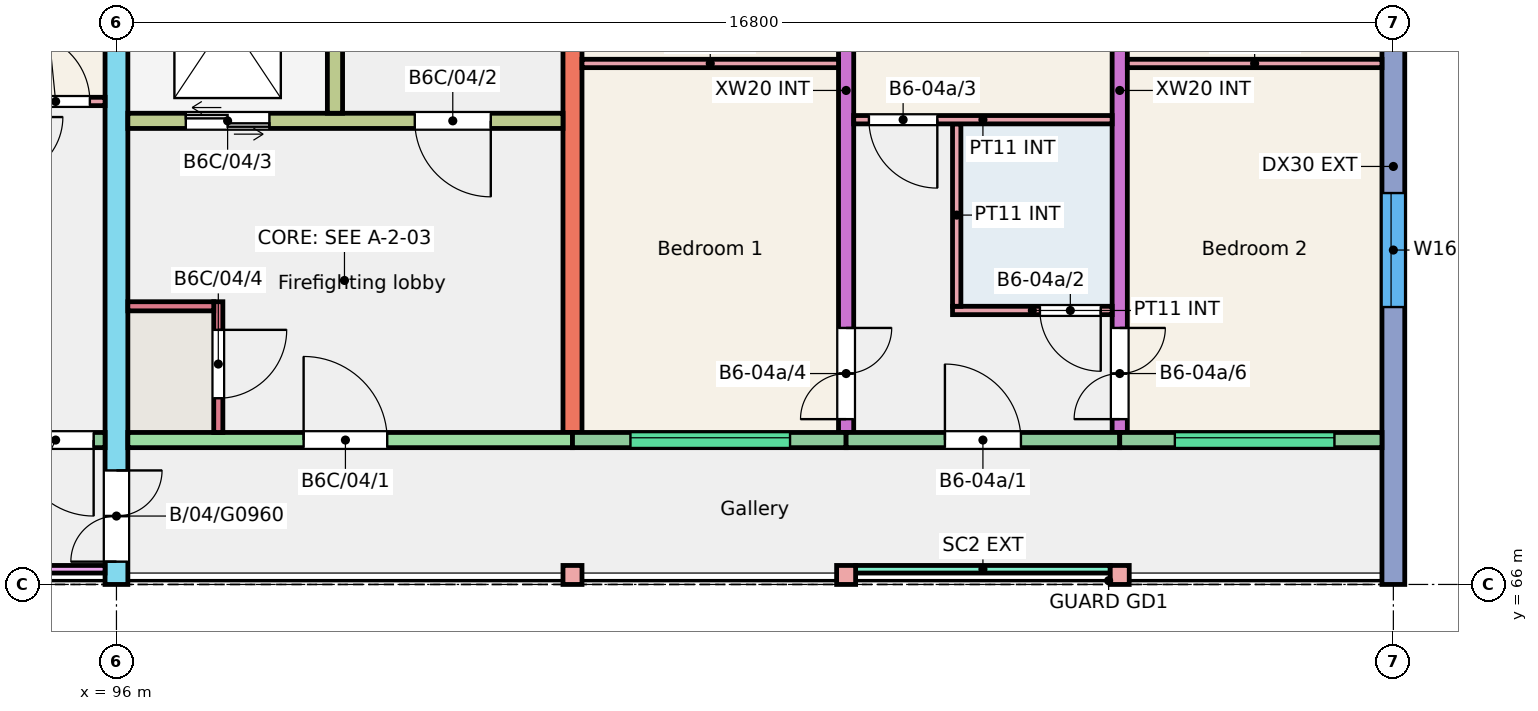
"""IFC4 building model, lengths in metres.
Left out: names, types, materials, properties, quantities, classifications, styles, units other than length and angle.
Written with IfcOpenShell. Run it as: python <this file> out.ifc"""

import sys

from ifc_helpers import new_model, si_unit, direction, frame, frame_2d, origin, origin_2d, place, context, subcontext, project, spatial, rectangle, extrude, element, fill, save


model = new_model("IFC4")
c1 = context("Model", 3, precision=1e-05, world=origin(), true_north=direction((0.0, 1.0)))
c2 = subcontext(c1, "Body", "Model", "MODEL_VIEW")
j1 = project(units=[si_unit("LENGTHUNIT", "METRE"), si_unit("PLANEANGLEUNIT", "RADIAN")], contexts=[c1])
p1 = place(None, origin())
s1 = spatial("IfcSite", under=j1, at=p1, CompositionType="ELEMENT")
p2 = place(p1, origin())
s2 = spatial("IfcBuilding", under=s1, at=p2, CompositionType="ELEMENT")
p3 = place(p2, frame((0.0, 0.0, 12.0)))
s3 = spatial("IfcBuildingStorey", under=s2, at=p3, CompositionType="ELEMENT", Elevation=12.0)
p4 = place(p3, frame((96.0, 66.0, 0.0), z_axis=(0.0, 0.0, 1.0), x_axis=(0.0, 1.0, 0.0)))
e1 = element("IfcWall", 1, at=p4, inside=s3, PredefinedType="SHEAR", context=c2, shape_type="SweptSolid", body=[
    extrude(rectangle(XDim=11.0, YDim=0.3, at=frame_2d((5.5, 0.0))), origin(), (0.0, 0.0, 1.0), 3.0),
])
p5 = place(p4, frame((0.3, 0.0, 0.0)))
e2 = element("IfcOpeningElement", 2, at=p5, cuts=e1, PredefinedType="OPENING", context=c2, shape_type="SweptSolid", body=[
    extrude(rectangle(XDim=1.2, YDim=2.1, at=frame_2d((0.6, 1.05))), frame((0.0, 0.16, 0.0), z_axis=(0.0, -1.0, 0.0), x_axis=(1.0, 0.0, 0.0)), (0.0, 0.0, 1.0), 0.32),
])
p6 = place(p3, frame((102.0, 68.0, 0.0), z_axis=(0.0, 0.0, 1.0), x_axis=(0.0, 1.0, 0.0)))
e3 = element("IfcWall", 3, at=p6, inside=s3, PredefinedType="SHEAR", context=c2, shape_type="SweptSolid", body=[
    extrude(rectangle(XDim=9.0, YDim=0.25, at=frame_2d((4.5, 0.0))), origin(), (0.0, 0.0, 1.0), 3.0),
])
p7 = place(p3, frame((105.6, 68.0, 0.0), z_axis=(0.0, 0.0, 1.0), x_axis=(0.0, 1.0, 0.0)))
e4 = element("IfcWall", 4, at=p7, inside=s3, PredefinedType="SHEAR", context=c2, shape_type="SweptSolid", body=[
    extrude(rectangle(XDim=9.0, YDim=0.2, at=frame_2d((4.5, 0.0))), origin(), (0.0, 0.0, 1.0), 3.0),
])
p8 = place(p7, frame((0.175, 0.0, 0.0)))
e5 = element("IfcOpeningElement", 5, at=p8, cuts=e4, PredefinedType="OPENING", context=c2, shape_type="SweptSolid", body=[
    extrude(rectangle(XDim=1.2, YDim=2.1, at=frame_2d((0.6, 1.05))), frame((0.0, 0.11, 0.0), z_axis=(0.0, -1.0, 0.0), x_axis=(1.0, 0.0, 0.0)), (0.0, 0.0, 1.0), 0.22),
])
p9 = place(p7, frame((6.4, 0.0, 0.0)))
e6 = element("IfcOpeningElement", 6, at=p9, cuts=e4, PredefinedType="OPENING", context=c2, shape_type="SweptSolid", body=[
    extrude(rectangle(XDim=1.2, YDim=2.1, at=frame_2d((0.6, 1.05))), frame((0.0, 0.11, 0.0), z_axis=(0.0, -1.0, 0.0), x_axis=(1.0, 0.0, 0.0)), (0.0, 0.0, 1.0), 0.22),
])
p10 = place(p3, frame((109.2, 68.0, 0.0), z_axis=(0.0, 0.0, 1.0), x_axis=(0.0, 1.0, 0.0)))
e7 = element("IfcWall", 7, at=p10, inside=s3, PredefinedType="SHEAR", context=c2, shape_type="SweptSolid", body=[
    extrude(rectangle(XDim=9.0, YDim=0.2, at=frame_2d((4.5, 0.0))), origin(), (0.0, 0.0, 1.0), 3.0),
])
p11 = place(p10, frame((0.175, 0.0, 0.0)))
e8 = element("IfcOpeningElement", 8, at=p11, cuts=e7, PredefinedType="OPENING", context=c2, shape_type="SweptSolid", body=[
    extrude(rectangle(XDim=1.2, YDim=2.1, at=frame_2d((0.6, 1.05))), frame((0.0, 0.11, 0.0), z_axis=(0.0, -1.0, 0.0), x_axis=(1.0, 0.0, 0.0)), (0.0, 0.0, 1.0), 0.22),
])
p12 = place(p10, frame((6.4, 0.0, 0.0)))
e9 = element("IfcOpeningElement", 9, at=p12, cuts=e7, PredefinedType="OPENING", context=c2, shape_type="SweptSolid", body=[
    extrude(rectangle(XDim=1.2, YDim=2.1, at=frame_2d((0.6, 1.05))), frame((0.0, 0.11, 0.0), z_axis=(0.0, -1.0, 0.0), x_axis=(1.0, 0.0, 0.0)), (0.0, 0.0, 1.0), 0.22),
])
p13 = place(p3, frame((112.8, 66.0, 0.0), z_axis=(0.0, 0.0, 1.0), x_axis=(0.0, 1.0, 0.0)))
e10 = element("IfcWall", 10, at=p13, inside=s3, PredefinedType="SHEAR", context=c2, shape_type="SweptSolid", body=[
    extrude(rectangle(XDim=11.0, YDim=0.3, at=frame_2d((5.5, 0.0))), origin(), (0.0, 0.0, 1.0), 3.0),
])
p14 = place(p13, frame((3.65, 0.0, 0.9)))
e11 = element("IfcOpeningElement", 11, at=p14, cuts=e10, PredefinedType="OPENING", context=c2, shape_type="SweptSolid", body=[
    extrude(rectangle(XDim=1.5, YDim=1.5, at=frame_2d((0.75, 0.75))), frame((0.0, 0.16, 0.0), z_axis=(0.0, -1.0, 0.0), x_axis=(1.0, 0.0, 0.0)), (0.0, 0.0, 1.0), 0.32),
])
p15 = place(p13, frame((8.205, 0.0, 0.9)))
e12 = element("IfcOpeningElement", 12, at=p15, cuts=e10, PredefinedType="OPENING", context=c2, shape_type="SweptSolid", body=[
    extrude(rectangle(XDim=1.5, YDim=1.5, at=frame_2d((0.75, 0.75))), frame((0.0, 0.16, 0.0), z_axis=(0.0, -1.0, 0.0), x_axis=(1.0, 0.0, 0.0)), (0.0, 0.0, 1.0), 0.32),
])
p16 = place(p3, frame((92.4, 67.9, 0.0), z_axis=(0.0, 0.0, 1.0), x_axis=(1.0, 0.0, 0.0)))
e13 = element("IfcWall", 13, at=p16, inside=s3, PredefinedType="SOLIDWALL", context=c2, shape_type="SweptSolid", body=[
    extrude(rectangle(XDim=3.45, YDim=0.2, at=frame_2d((1.725, 0.0))), origin(), (0.0, 0.0, 1.0), 3.0),
])
p17 = place(p16, frame((0.47, 0.0, 1.1)))
e14 = element("IfcOpeningElement", 14, at=p17, cuts=e13, PredefinedType="OPENING", context=c2, shape_type="SweptSolid", body=[
    extrude(rectangle(XDim=1.2, YDim=1.3, at=frame_2d((0.6, 0.65))), frame((0.0, 0.11, 0.0), z_axis=(0.0, -1.0, 0.0), x_axis=(1.0, 0.0, 0.0)), (0.0, 0.0, 1.0), 0.22),
])
p18 = place(p16, frame((2.3, 0.0, 0.0)))
e15 = element("IfcOpeningElement", 15, at=p18, cuts=e13, PredefinedType="OPENING", context=c2, shape_type="SweptSolid", body=[
    extrude(rectangle(XDim=1.0, YDim=2.1, at=frame_2d((0.5, 1.05))), frame((0.0, 0.11, 0.0), z_axis=(0.0, -1.0, 0.0), x_axis=(1.0, 0.0, 0.0)), (0.0, 0.0, 1.0), 0.22),
])
p19 = place(p3, frame((96.15, 67.9, 0.0), z_axis=(0.0, 0.0, 1.0), x_axis=(1.0, 0.0, 0.0)))
e16 = element("IfcWall", 16, at=p19, inside=s3, PredefinedType="SHEAR", context=c2, shape_type="SweptSolid", body=[
    extrude(rectangle(XDim=5.85, YDim=0.2, at=frame_2d((2.925, 0.0))), origin(), (0.0, 0.0, 1.0), 3.0),
])
p20 = place(p19, frame((2.312, 0.0, 0.0)))
e17 = element("IfcOpeningElement", 17, at=p20, cuts=e16, PredefinedType="OPENING", context=c2, shape_type="SweptSolid", body=[
    extrude(rectangle(XDim=1.1, YDim=2.1, at=frame_2d((0.55, 1.05))), frame((0.0, 0.11, 0.0), z_axis=(0.0, -1.0, 0.0), x_axis=(1.0, 0.0, 0.0)), (0.0, 0.0, 1.0), 0.22),
])
p21 = place(p3, frame((96.15, 72.1, 0.0), z_axis=(0.0, 0.0, 1.0), x_axis=(1.0, 0.0, 0.0)))
e18 = element("IfcWall", 18, at=p21, inside=s3, PredefinedType="SHEAR", context=c2, shape_type="SweptSolid", body=[
    extrude(rectangle(XDim=5.725, YDim=0.2, at=frame_2d((2.863, 0.0))), origin(), (0.0, 0.0, 1.0), 3.0),
])
p22 = place(p21, frame((3.775, 0.0, 0.0)))
e19 = element("IfcOpeningElement", 19, at=p22, cuts=e18, PredefinedType="OPENING", context=c2, shape_type="SweptSolid", body=[
    extrude(rectangle(XDim=1.0, YDim=2.1, at=frame_2d((0.5, 1.05))), frame((0.0, 0.11, 0.0), z_axis=(0.0, -1.0, 0.0), x_axis=(1.0, 0.0, 0.0)), (0.0, 0.0, 1.0), 0.22),
])
p23 = place(p21, frame((0.762, 0.0, 0.0)))
e20 = element("IfcOpeningElement", 20, at=p23, cuts=e18, PredefinedType="OPENING", context=c2, shape_type="SweptSolid", body=[
    extrude(rectangle(XDim=1.1, YDim=2.1, at=frame_2d((0.55, 1.05))), frame((0.0, 0.11, 0.0), z_axis=(0.0, -1.0, 0.0), x_axis=(1.0, 0.0, 0.0)), (0.0, 0.0, 1.0), 0.22),
])
p24 = place(p3, frame((98.875, 72.2, 0.0), z_axis=(0.0, 0.0, 1.0), x_axis=(0.0, 1.0, 0.0)))
e21 = element("IfcWall", 21, at=p24, inside=s3, PredefinedType="SHEAR", context=c2, shape_type="SweptSolid", body=[
    extrude(rectangle(XDim=4.8, YDim=0.2, at=frame_2d((2.4, 0.0))), origin(), (0.0, 0.0, 1.0), 3.0),
])
p25 = place(p3, frame((97.34, 68.0, 0.0), z_axis=(0.0, 0.0, 1.0), x_axis=(0.0, 1.0, 0.0)))
e22 = element("IfcWall", 22, at=p25, inside=s3, PredefinedType="SHEAR", context=c2, shape_type="SweptSolid", body=[
    extrude(rectangle(XDim=1.72, YDim=0.12, at=frame_2d((0.86, 0.0))), origin(), (0.0, 0.0, 1.0), 3.0),
])
p26 = place(p25, frame((0.45, 0.0, 0.0)))
e23 = element("IfcOpeningElement", 23, at=p26, cuts=e22, PredefinedType="OPENING", context=c2, shape_type="SweptSolid", body=[
    extrude(rectangle(XDim=0.9, YDim=2.1, at=frame_2d((0.45, 1.05))), frame((0.0, 0.07, 0.0), z_axis=(0.0, -1.0, 0.0), x_axis=(1.0, 0.0, 0.0)), (0.0, 0.0, 1.0), 0.14),
])
p27 = place(p3, frame((96.15, 69.66, 0.0), z_axis=(0.0, 0.0, 1.0), x_axis=(1.0, 0.0, 0.0)))
e24 = element("IfcWall", 24, at=p27, inside=s3, PredefinedType="SHEAR", context=c2, shape_type="SweptSolid", body=[
    extrude(rectangle(XDim=1.13, YDim=0.12, at=frame_2d((0.565, 0.0))), origin(), (0.0, 0.0, 1.0), 3.0),
])
p28 = place(p3, frame((102.0, 67.9, 0.0), z_axis=(0.0, 0.0, 1.0), x_axis=(1.0, 0.0, 0.0)))
e25 = element("IfcWall", 25, at=p28, inside=s3, PredefinedType="SOLIDWALL", context=c2, shape_type="SweptSolid", body=[
    extrude(rectangle(XDim=3.6, YDim=0.2, at=frame_2d((1.8, 0.0))), origin(), (0.0, 0.0, 1.0), 3.0),
])
p29 = place(p28, frame((0.762, 0.0, 1.2)))
e26 = element("IfcOpeningElement", 26, at=p29, cuts=e25, PredefinedType="OPENING", context=c2, shape_type="SweptSolid", body=[
    extrude(rectangle(XDim=2.1, YDim=1.2, at=frame_2d((1.05, 0.6))), frame((0.0, 0.11, 0.0), z_axis=(0.0, -1.0, 0.0), x_axis=(1.0, 0.0, 0.0)), (0.0, 0.0, 1.0), 0.22),
])
p30 = place(p3, frame((105.6, 67.9, 0.0), z_axis=(0.0, 0.0, 1.0), x_axis=(1.0, 0.0, 0.0)))
e27 = element("IfcWall", 27, at=p30, inside=s3, PredefinedType="SOLIDWALL", context=c2, shape_type="SweptSolid", body=[
    extrude(rectangle(XDim=3.6, YDim=0.2, at=frame_2d((1.8, 0.0))), origin(), (0.0, 0.0, 1.0), 3.0),
])
p31 = place(p30, frame((1.3, 0.0, 0.0)))
e28 = element("IfcOpeningElement", 28, at=p31, cuts=e27, PredefinedType="OPENING", context=c2, shape_type="SweptSolid", body=[
    extrude(rectangle(XDim=1.0, YDim=2.1, at=frame_2d((0.5, 1.05))), frame((0.0, 0.11, 0.0), z_axis=(0.0, -1.0, 0.0), x_axis=(1.0, 0.0, 0.0)), (0.0, 0.0, 1.0), 0.22),
])
p32 = place(p3, frame((109.2, 67.9, 0.0), z_axis=(0.0, 0.0, 1.0), x_axis=(1.0, 0.0, 0.0)))
e29 = element("IfcWall", 29, at=p32, inside=s3, PredefinedType="SOLIDWALL", context=c2, shape_type="SweptSolid", body=[
    extrude(rectangle(XDim=3.45, YDim=0.2, at=frame_2d((1.725, 0.0))), origin(), (0.0, 0.0, 1.0), 3.0),
])
p33 = place(p32, frame((0.725, 0.0, 1.2)))
e30 = element("IfcOpeningElement", 30, at=p33, cuts=e29, PredefinedType="OPENING", context=c2, shape_type="SweptSolid", body=[
    extrude(rectangle(XDim=2.1, YDim=1.2, at=frame_2d((1.05, 0.6))), frame((0.0, 0.11, 0.0), z_axis=(0.0, -1.0, 0.0), x_axis=(1.0, 0.0, 0.0)), (0.0, 0.0, 1.0), 0.22),
])
for number, where, z_axis, x_axis in (
    (31, (102.0, 66.125, 0.0), (0.0, 0.0, 1.0), (1.0, 0.0, 0.0)),
    (32, (105.6, 66.125, 0.0), (0.0, 0.0, 1.0), (1.0, 0.0, 0.0)),
    (33, (109.2, 66.125, 0.0), (0.0, 0.0, 1.0), (1.0, 0.0, 0.0)),
):
    element("IfcColumn", number, at=place(p3, frame(where, z_axis=z_axis, x_axis=x_axis)), inside=s3, PredefinedType="COLUMN", context=c2, shape_type="SweptSolid", body=[
        extrude(rectangle(XDim=0.25, YDim=0.25, at=origin_2d()), origin(), (0.0, 0.0, 1.0), 3.0),
    ])
p34 = place(p3, frame((92.525, 66.2, 0.0), z_axis=(0.0, 0.0, 1.0), x_axis=(1.0, 0.0, 0.0)))
e34 = element("IfcWall", 34, at=p34, inside=s3, PredefinedType="SOLIDWALL", context=c2, shape_type="SweptSolid", body=[
    extrude(rectangle(XDim=3.325, YDim=0.1, at=frame_2d((1.663, 0.0))), origin(), (0.0, 0.0, 1.0), 2.45),
])
p35 = place(p3, frame((105.725, 66.2, 0.0), z_axis=(0.0, 0.0, 1.0), x_axis=(1.0, 0.0, 0.0)))
e35 = element("IfcWall", 35, at=p35, inside=s3, PredefinedType="SOLIDWALL", context=c2, shape_type="SweptSolid", body=[
    extrude(rectangle(XDim=3.35, YDim=0.1, at=frame_2d((1.675, 0.0))), origin(), (0.0, 0.0, 1.0), 2.45),
])
p36 = place(p3, frame((92.5, 72.355, 0.0), z_axis=(0.0, 0.0, 1.0), x_axis=(1.0, 0.0, 0.0)))
e36 = element("IfcWall", 36, at=p36, inside=s3, PredefinedType="PARTITIONING", context=c2, shape_type="SweptSolid", body=[
    extrude(rectangle(XDim=3.35, YDim=0.11, at=frame_2d((1.675, 0.0))), origin(), (0.0, 0.0, 1.0), 2.8),
])
p37 = place(p36, frame((2.25, 0.0, 0.0)))
e37 = element("IfcOpeningElement", 37, at=p37, cuts=e36, PredefinedType="OPENING", context=c2, shape_type="SweptSolid", body=[
    extrude(rectangle(XDim=0.9, YDim=2.1, at=frame_2d((0.45, 1.05))), frame((0.0, 0.065, 0.0), z_axis=(0.0, -1.0, 0.0), x_axis=(1.0, 0.0, 0.0)), (0.0, 0.0, 1.0), 0.13),
])
p38 = place(p3, frame((107.0, 69.605, 0.0), z_axis=(0.0, 0.0, 1.0), x_axis=(1.0, 0.0, 0.0)))
e38 = element("IfcWall", 38, at=p38, inside=s3, PredefinedType="PARTITIONING", context=c2, shape_type="SweptSolid", body=[
    extrude(rectangle(XDim=2.1, YDim=0.11, at=frame_2d((1.05, 0.0))), origin(), (0.0, 0.0, 1.0), 2.8),
])
p39 = place(p38, frame((1.15, 0.0, 0.0)))
e39 = element("IfcOpeningElement", 39, at=p39, cuts=e38, PredefinedType="OPENING", context=c2, shape_type="SweptSolid", body=[
    extrude(rectangle(XDim=0.8, YDim=2.1, at=frame_2d((0.4, 1.05))), frame((0.0, 0.065, 0.0), z_axis=(0.0, -1.0, 0.0), x_axis=(1.0, 0.0, 0.0)), (0.0, 0.0, 1.0), 0.13),
])
p40 = place(p3, frame((107.055, 69.66, 0.0), z_axis=(0.0, 0.0, 1.0), x_axis=(0.0, 1.0, 0.0)))
e40 = element("IfcWall", 40, at=p40, inside=s3, PredefinedType="PARTITIONING", context=c2, shape_type="SweptSolid", body=[
    extrude(rectangle(XDim=2.4, YDim=0.11, at=frame_2d((1.2, 0.0))), origin(), (0.0, 0.0, 1.0), 2.8),
])
p41 = place(p3, frame((105.7, 72.115, 0.0), z_axis=(0.0, 0.0, 1.0), x_axis=(1.0, 0.0, 0.0)))
e41 = element("IfcWall", 41, at=p41, inside=s3, PredefinedType="PARTITIONING", context=c2, shape_type="SweptSolid", body=[
    extrude(rectangle(XDim=3.4, YDim=0.11, at=frame_2d((1.7, 0.0))), origin(), (0.0, 0.0, 1.0), 2.8),
])
p42 = place(p41, frame((0.2, 0.0, 0.0)))
e42 = element("IfcOpeningElement", 42, at=p42, cuts=e41, PredefinedType="OPENING", context=c2, shape_type="SweptSolid", body=[
    extrude(rectangle(XDim=0.9, YDim=2.1, at=frame_2d((0.45, 1.05))), frame((0.0, 0.065, 0.0), z_axis=(0.0, -1.0, 0.0), x_axis=(1.0, 0.0, 0.0)), (0.0, 0.0, 1.0), 0.13),
])
p43 = place(p3, frame((102.125, 72.855, 0.0), z_axis=(0.0, 0.0, 1.0), x_axis=(1.0, 0.0, 0.0)))
e43 = element("IfcWall", 43, at=p43, inside=s3, PredefinedType="PARTITIONING", context=c2, shape_type="SweptSolid", body=[
    extrude(rectangle(XDim=3.375, YDim=0.11, at=frame_2d((1.688, 0.0))), origin(), (0.0, 0.0, 1.0), 2.8),
])
p44 = place(p3, frame((109.3, 72.855, 0.0), z_axis=(0.0, 0.0, 1.0), x_axis=(1.0, 0.0, 0.0)))
e44 = element("IfcWall", 44, at=p44, inside=s3, PredefinedType="PARTITIONING", context=c2, shape_type="SweptSolid", body=[
    extrude(rectangle(XDim=3.35, YDim=0.11, at=frame_2d((1.675, 0.0))), origin(), (0.0, 0.0, 1.0), 2.8),
])
p45 = place(p29, origin())
e45 = element("IfcWindow", 45, at=p45, inside=s3, PartitioningType="SINGLE_PANEL", PredefinedType="WINDOW", context=c2, shape_type="SweptSolid", body=[
    extrude(rectangle(XDim=2.1, YDim=1.2, at=frame_2d((1.05, 0.6))), frame((0.0, 0.06, 0.0), z_axis=(0.0, -1.0, 0.0), x_axis=(1.0, 0.0, 0.0)), (0.0, 0.0, 1.0), 0.06),
])
fill(e26, e45)
p46 = place(p33, origin())
e46 = element("IfcWindow", 46, at=p46, inside=s3, PartitioningType="SINGLE_PANEL", PredefinedType="WINDOW", context=c2, shape_type="SweptSolid", body=[
    extrude(rectangle(XDim=2.1, YDim=1.2, at=frame_2d((1.05, 0.6))), frame((0.0, 0.06, 0.0), z_axis=(0.0, -1.0, 0.0), x_axis=(1.0, 0.0, 0.0)), (0.0, 0.0, 1.0), 0.06),
])
fill(e30, e46)
p47 = place(p14, origin())
e47 = element("IfcWindow", 47, at=p47, inside=s3, PartitioningType="SINGLE_PANEL", PredefinedType="WINDOW", context=c2, shape_type="SweptSolid", body=[
    extrude(rectangle(XDim=1.5, YDim=1.5, at=frame_2d((0.75, 0.75))), frame((0.0, 0.06, 0.0), z_axis=(0.0, -1.0, 0.0), x_axis=(1.0, 0.0, 0.0)), (0.0, 0.0, 1.0), 0.06),
])
fill(e11, e47)
p48 = place(p18, origin())
e48 = element("IfcDoor", 48, at=p48, inside=s3, OperationType="SINGLE_SWING_RIGHT", PredefinedType="DOOR", context=c2, shape_type="SweptSolid", body=[
    extrude(rectangle(XDim=1.0, YDim=2.1, at=frame_2d((0.5, 1.05))), frame((0.0, 0.025, 0.0), z_axis=(0.0, -1.0, 0.0), x_axis=(1.0, 0.0, 0.0)), (0.0, 0.0, 1.0), 0.05),
])
fill(e15, e48)
p49 = place(p37, origin())
e49 = element("IfcDoor", 49, at=p49, inside=s3, OperationType="SINGLE_SWING_LEFT", PredefinedType="DOOR", context=c2, shape_type="SweptSolid", body=[
    extrude(rectangle(XDim=0.9, YDim=2.1, at=frame_2d((0.45, 1.05))), frame((0.0, 0.025, 0.0), z_axis=(0.0, -1.0, 0.0), x_axis=(1.0, 0.0, 0.0)), (0.0, 0.0, 1.0), 0.05),
])
fill(e37, e49)
p50 = place(p31, origin())
e50 = element("IfcDoor", 50, at=p50, inside=s3, OperationType="SINGLE_SWING_LEFT", PredefinedType="DOOR", context=c2, shape_type="SweptSolid", body=[
    extrude(rectangle(XDim=1.0, YDim=2.1, at=frame_2d((0.5, 1.05))), frame((0.0, 0.025, 0.0), z_axis=(0.0, -1.0, 0.0), x_axis=(1.0, 0.0, 0.0)), (0.0, 0.0, 1.0), 0.05),
])
fill(e28, e50)
p51 = place(p39, origin())
e51 = element("IfcDoor", 51, at=p51, inside=s3, OperationType="SINGLE_SWING_RIGHT", PredefinedType="DOOR", context=c2, shape_type="SweptSolid", body=[
    extrude(rectangle(XDim=0.8, YDim=2.1, at=frame_2d((0.4, 1.05))), frame((0.0, 0.025, 0.0), z_axis=(0.0, -1.0, 0.0), x_axis=(1.0, 0.0, 0.0)), (0.0, 0.0, 1.0), 0.05),
])
fill(e39, e51)
p52 = place(p42, origin())
e52 = element("IfcDoor", 52, at=p52, inside=s3, OperationType="SINGLE_SWING_RIGHT", PredefinedType="DOOR", context=c2, shape_type="SweptSolid", body=[
    extrude(rectangle(XDim=0.9, YDim=2.1, at=frame_2d((0.45, 1.05))), frame((0.0, 0.025, 0.0), z_axis=(0.0, -1.0, 0.0), x_axis=(1.0, 0.0, 0.0)), (0.0, 0.0, 1.0), 0.05),
])
fill(e42, e52)
p53 = place(p8, origin())
e53 = element("IfcDoor", 53, at=p53, inside=s3, OperationType="DOUBLE_DOOR_SINGLE_SWING", PredefinedType="DOOR", context=c2, shape_type="SweptSolid", body=[
    extrude(rectangle(XDim=1.2, YDim=2.1, at=frame_2d((0.6, 1.05))), frame((0.0, 0.025, 0.0), z_axis=(0.0, -1.0, 0.0), x_axis=(1.0, 0.0, 0.0)), (0.0, 0.0, 1.0), 0.05),
])
fill(e5, e53)
p54 = place(p11, origin())
e54 = element("IfcDoor", 54, at=p54, inside=s3, OperationType="DOUBLE_DOOR_SINGLE_SWING", PredefinedType="DOOR", context=c2, shape_type="SweptSolid", body=[
    extrude(rectangle(XDim=1.2, YDim=2.1, at=frame_2d((0.6, 1.05))), frame((0.0, 0.025, 0.0), z_axis=(0.0, -1.0, 0.0), x_axis=(1.0, 0.0, 0.0)), (0.0, 0.0, 1.0), 0.05),
])
fill(e8, e54)
p55 = place(p20, origin())
e55 = element("IfcDoor", 55, at=p55, inside=s3, OperationType="SINGLE_SWING_LEFT", PredefinedType="DOOR", context=c2, shape_type="SweptSolid", body=[
    extrude(rectangle(XDim=1.1, YDim=2.1, at=frame_2d((0.55, 1.05))), frame((0.0, 0.025, 0.0), z_axis=(0.0, -1.0, 0.0), x_axis=(1.0, 0.0, 0.0)), (0.0, 0.0, 1.0), 0.05),
])
fill(e17, e55)
p56 = place(p22, origin())
e56 = element("IfcDoor", 56, at=p56, inside=s3, OperationType="SINGLE_SWING_RIGHT", PredefinedType="DOOR", context=c2, shape_type="SweptSolid", body=[
    extrude(rectangle(XDim=1.0, YDim=2.1, at=frame_2d((0.5, 1.05))), frame((0.0, 0.025, 0.0), z_axis=(0.0, -1.0, 0.0), x_axis=(1.0, 0.0, 0.0)), (0.0, 0.0, 1.0), 0.05),
])
fill(e19, e56)
p57 = place(p23, origin())
e57 = element("IfcDoor", 57, at=p57, inside=s3, OperationType="DOUBLE_DOOR_SLIDING", PredefinedType="DOOR", context=c2, shape_type="SweptSolid", body=[
    extrude(rectangle(XDim=1.1, YDim=2.1, at=frame_2d((0.55, 1.05))), frame((0.0, 0.025, 0.0), z_axis=(0.0, -1.0, 0.0), x_axis=(1.0, 0.0, 0.0)), (0.0, 0.0, 1.0), 0.05),
])
fill(e20, e57)
p58 = place(p26, origin())
e58 = element("IfcDoor", 58, at=p58, inside=s3, OperationType="SINGLE_SWING_RIGHT", PredefinedType="DOOR", context=c2, shape_type="SweptSolid", body=[
    extrude(rectangle(XDim=0.9, YDim=2.1, at=frame_2d((0.45, 1.05))), frame((0.0, 0.025, 0.0), z_axis=(0.0, -1.0, 0.0), x_axis=(1.0, 0.0, 0.0)), (0.0, 0.0, 1.0), 0.05),
])
fill(e23, e58)
p59 = place(p5, origin())
e59 = element("IfcDoor", 59, at=p59, inside=s3, OperationType="DOUBLE_DOOR_SINGLE_SWING", PredefinedType="DOOR", context=c2, shape_type="SweptSolid", body=[
    extrude(rectangle(XDim=1.2, YDim=2.1, at=frame_2d((0.6, 1.05))), frame((0.0, 0.025, 0.0), z_axis=(0.0, -1.0, 0.0), x_axis=(1.0, 0.0, 0.0)), (0.0, 0.0, 1.0), 0.05),
])
fill(e2, e59)
save(model, sys.argv[1])
